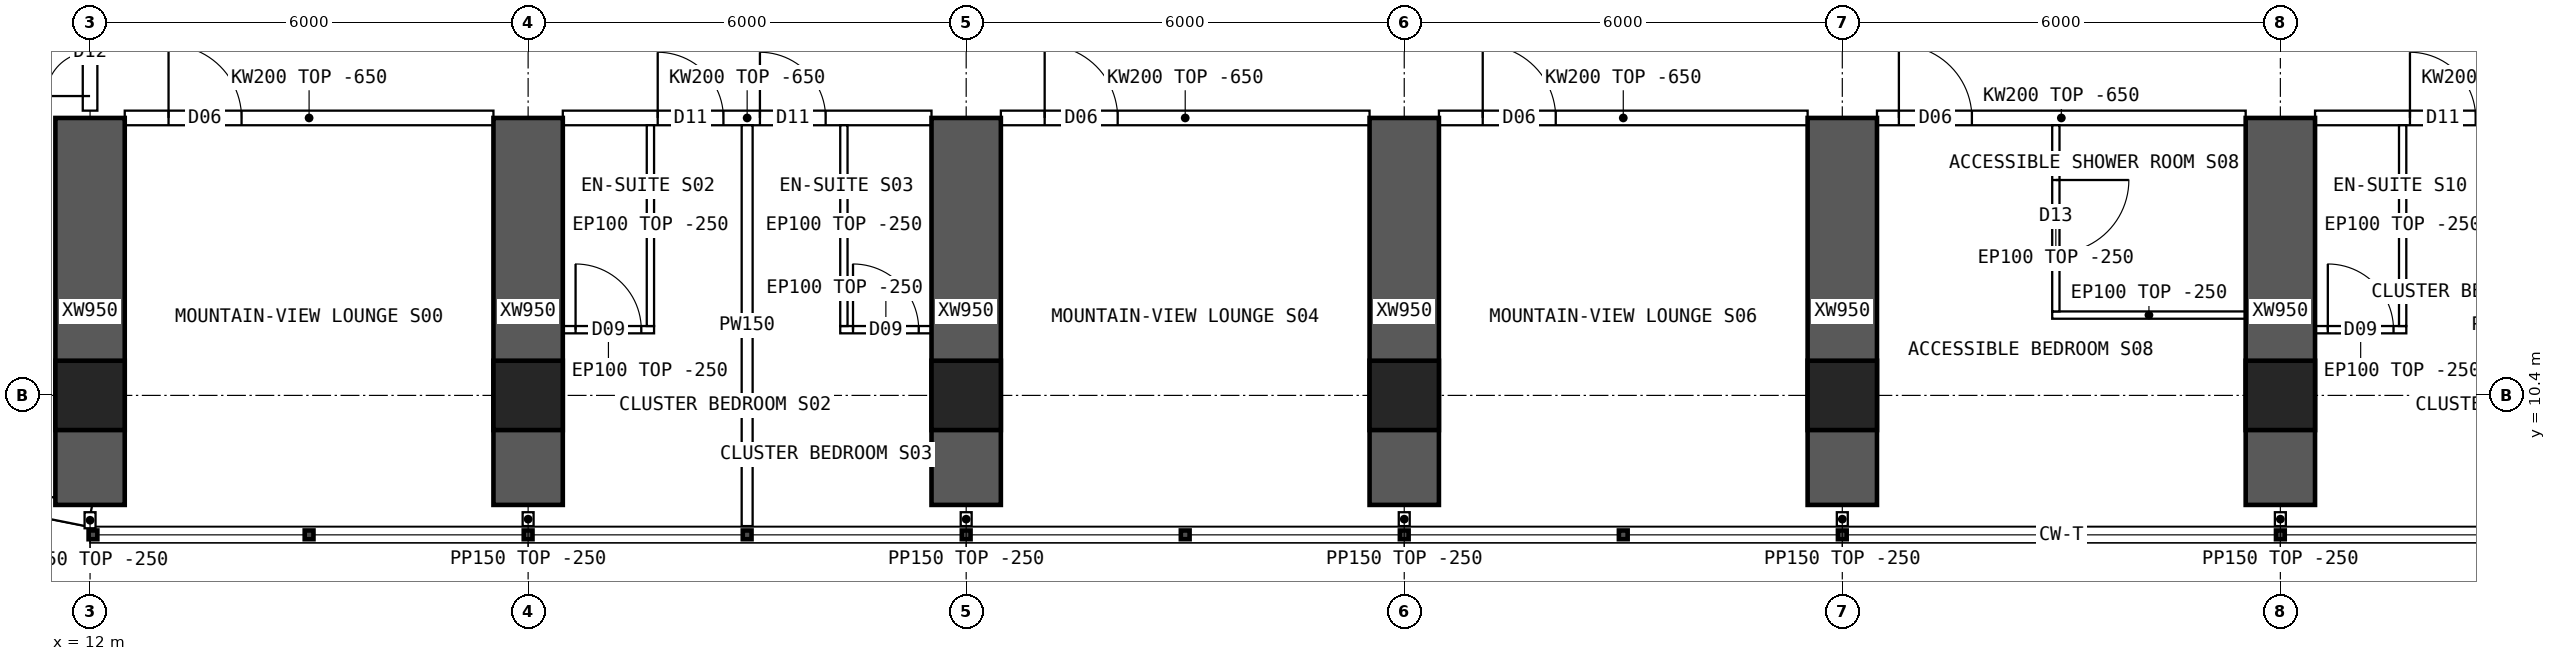
"""IFC4 building model, lengths in metres.
Left out: names, types, materials, properties, quantities, classifications, styles, units other than length and angle.
Written with IfcOpenShell. Run it as: python <this file> out.ifc"""

import sys

from ifc_helpers import new_model, si_unit, direction, frame, frame_2d, origin, origin_2d, place, context, subcontext, project, spatial, polyline, rectangle, hollow_rectangle, outline, extrude, element, fill, save


model = new_model("IFC4")
c1 = context("Model", 3, precision=1e-05, world=origin(), true_north=direction((0.0, 1.0)))
c2 = subcontext(c1, "Body", "Model", "MODEL_VIEW")
j1 = project(units=[si_unit("LENGTHUNIT", "METRE"), si_unit("PLANEANGLEUNIT", "RADIAN")], contexts=[c1])
p1 = place(None, origin())
s1 = spatial("IfcSite", under=j1, at=p1, CompositionType="ELEMENT")
p2 = place(p1, origin())
s2 = spatial("IfcBuilding", under=s1, at=p2, CompositionType="ELEMENT")
p3 = place(p2, frame((0.0, 0.0, 106.9)))
s3 = spatial("IfcBuildingStorey", under=s2, at=p3, CompositionType="ELEMENT", Elevation=106.9)
for number, where, z_axis, x_axis in (
    (1, (12.0, 10.4, 0.0), (0.0, 0.0, 1.0), (1.0, 0.0, 0.0)),
    (2, (18.0, 10.4, 0.0), (0.0, 0.0, 1.0), (1.0, 0.0, 0.0)),
    (3, (24.0, 10.4, 0.0), (0.0, 0.0, 1.0), (1.0, 0.0, 0.0)),
    (4, (30.0, 10.4, 0.0), (0.0, 0.0, 1.0), (1.0, 0.0, 0.0)),
    (5, (36.0, 10.4, 0.0), (0.0, 0.0, 1.0), (1.0, 0.0, 0.0)),
    (6, (42.0, 10.4, 0.0), (0.0, 0.0, 1.0), (1.0, 0.0, 0.0)),
):
    element("IfcColumn", number, at=place(p3, frame(where, z_axis=z_axis, x_axis=x_axis)), inside=s3, PredefinedType="COLUMN", context=c2, shape_type="SweptSolid", body=[
        extrude(hollow_rectangle(XDim=0.95, YDim=0.95, WallThickness=0.095, at=origin_2d()), origin(), (0.0, 0.0, 1.0), 3.75),
    ])
for number, where, z_axis, x_axis in (
    (7, (12.0, 8.9, 0.0), (0.0, 0.0, 1.0), (0.0, 1.0, 0.0)),
    (8, (18.0, 8.9, 0.0), (0.0, 0.0, 1.0), (0.0, 1.0, 0.0)),
    (9, (24.0, 8.9, 0.0), (0.0, 0.0, 1.0), (0.0, 1.0, 0.0)),
    (10, (30.0, 8.9, 0.0), (0.0, 0.0, 1.0), (0.0, 1.0, 0.0)),
    (11, (36.0, 8.9, 0.0), (0.0, 0.0, 1.0), (0.0, 1.0, 0.0)),
    (12, (42.0, 8.9, 0.0), (0.0, 0.0, 1.0), (0.0, 1.0, 0.0)),
):
    element("IfcWall", number, at=place(p3, frame(where, z_axis=z_axis, x_axis=x_axis)), inside=s3, PredefinedType="SHEAR", context=c2, shape_type="SweptSolid", body=[
        extrude(rectangle(XDim=5.3, YDim=0.95, at=frame_2d((2.65, 0.0))), origin(), (0.0, 0.0, 1.0), 3.75),
    ])
p4 = place(p3, frame((8.843, 9.378, 0.0), z_axis=(0.0, 0.0, 1.0), x_axis=(0.980787251524, -0.195080412259, 0.0)))
e13 = element("IfcWall", 13, at=p4, inside=s3, PredefinedType="SOLIDWALL", context=c2, shape_type="SweptSolid", body=[
    extrude(outline(polyline([(-0.03, -0.15), (3.249, -0.15), (3.189, 0.15), (0.03, 0.15), (-0.03, -0.15)])), origin(), (0.0, 0.0, 1.0), 3.5),
])
p5 = place(p4, frame((0.909, 0.0, 0.9)))
e14 = element("IfcOpeningElement", 14, at=p5, cuts=e13, PredefinedType="OPENING", context=c2, shape_type="SweptSolid", body=[
    extrude(rectangle(XDim=1.4, YDim=1.8, at=frame_2d((0.7, 0.9))), frame((0.0, 0.16, 0.0), z_axis=(0.0, -1.0, 0.0), x_axis=(1.0, 0.0, 0.0)), (0.0, 0.0, 1.0), 0.32),
])
p6 = place(p3, frame((12.475, 14.2, 0.0), z_axis=(0.0, 0.0, 1.0), x_axis=(1.0, 0.0, 0.0)))
e15 = element("IfcWall", 15, at=p6, inside=s3, PredefinedType="SOLIDWALL", context=c2, shape_type="SweptSolid", body=[
    extrude(outline(polyline([(0.0, 0.0), (5.05, 0.0), (5.05, 3.1), (0.0, 3.1), (0.0, 0.0)])), frame((0.0, 0.1, 0.0), z_axis=(0.0, -1.0, 0.0), x_axis=(1.0, 0.0, 0.0)), (0.0, 0.0, 1.0), 0.2),
])
p7 = place(p6, frame((0.6, 0.0, 0.0)))
e16 = element("IfcOpeningElement", 16, at=p7, cuts=e15, PredefinedType="OPENING", context=c2, shape_type="SweptSolid", body=[
    extrude(rectangle(XDim=1.0, YDim=2.1, at=frame_2d((0.5, 1.05))), frame((0.0, 0.11, 0.0), z_axis=(0.0, -1.0, 0.0), x_axis=(1.0, 0.0, 0.0)), (0.0, 0.0, 1.0), 0.22),
])
p8 = place(p3, frame((18.475, 14.2, 0.0), z_axis=(0.0, 0.0, 1.0), x_axis=(1.0, 0.0, 0.0)))
e17 = element("IfcWall", 17, at=p8, inside=s3, PredefinedType="SOLIDWALL", context=c2, shape_type="SweptSolid", body=[
    extrude(outline(polyline([(0.0, 0.0), (5.05, 0.0), (5.05, 3.1), (0.0, 3.1), (0.0, 0.0)])), frame((0.0, 0.1, 0.0), z_axis=(0.0, -1.0, 0.0), x_axis=(1.0, 0.0, 0.0)), (0.0, 0.0, 1.0), 0.2),
])
p9 = place(p8, frame((1.3, 0.0, 0.0)))
e18 = element("IfcOpeningElement", 18, at=p9, cuts=e17, PredefinedType="OPENING", context=c2, shape_type="SweptSolid", body=[
    extrude(rectangle(XDim=0.9, YDim=2.1, at=frame_2d((0.45, 1.05))), frame((0.0, 0.11, 0.0), z_axis=(0.0, -1.0, 0.0), x_axis=(1.0, 0.0, 0.0)), (0.0, 0.0, 1.0), 0.22),
])
p10 = place(p8, frame((2.7, 0.0, 0.0)))
e19 = element("IfcOpeningElement", 19, at=p10, cuts=e17, PredefinedType="OPENING", context=c2, shape_type="SweptSolid", body=[
    extrude(rectangle(XDim=0.9, YDim=2.1, at=frame_2d((0.45, 1.05))), frame((0.0, 0.11, 0.0), z_axis=(0.0, -1.0, 0.0), x_axis=(1.0, 0.0, 0.0)), (0.0, 0.0, 1.0), 0.22),
])
p11 = place(p3, frame((24.475, 14.2, 0.0), z_axis=(0.0, 0.0, 1.0), x_axis=(1.0, 0.0, 0.0)))
e20 = element("IfcWall", 20, at=p11, inside=s3, PredefinedType="SOLIDWALL", context=c2, shape_type="SweptSolid", body=[
    extrude(outline(polyline([(0.0, 0.0), (5.05, 0.0), (5.05, 3.1), (0.0, 3.1), (0.0, 0.0)])), frame((0.0, 0.1, 0.0), z_axis=(0.0, -1.0, 0.0), x_axis=(1.0, 0.0, 0.0)), (0.0, 0.0, 1.0), 0.2),
])
p12 = place(p11, frame((0.6, 0.0, 0.0)))
e21 = element("IfcOpeningElement", 21, at=p12, cuts=e20, PredefinedType="OPENING", context=c2, shape_type="SweptSolid", body=[
    extrude(rectangle(XDim=1.0, YDim=2.1, at=frame_2d((0.5, 1.05))), frame((0.0, 0.11, 0.0), z_axis=(0.0, -1.0, 0.0), x_axis=(1.0, 0.0, 0.0)), (0.0, 0.0, 1.0), 0.22),
])
p13 = place(p3, frame((30.475, 14.2, 0.0), z_axis=(0.0, 0.0, 1.0), x_axis=(1.0, 0.0, 0.0)))
e22 = element("IfcWall", 22, at=p13, inside=s3, PredefinedType="SOLIDWALL", context=c2, shape_type="SweptSolid", body=[
    extrude(outline(polyline([(0.0, 0.0), (5.05, 0.0), (5.05, 3.1), (0.0, 3.1), (0.0, 0.0)])), frame((0.0, 0.1, 0.0), z_axis=(0.0, -1.0, 0.0), x_axis=(1.0, 0.0, 0.0)), (0.0, 0.0, 1.0), 0.2),
])
p14 = place(p13, frame((0.6, 0.0, 0.0)))
e23 = element("IfcOpeningElement", 23, at=p14, cuts=e22, PredefinedType="OPENING", context=c2, shape_type="SweptSolid", body=[
    extrude(rectangle(XDim=1.0, YDim=2.1, at=frame_2d((0.5, 1.05))), frame((0.0, 0.11, 0.0), z_axis=(0.0, -1.0, 0.0), x_axis=(1.0, 0.0, 0.0)), (0.0, 0.0, 1.0), 0.22),
])
p15 = place(p3, frame((36.475, 14.2, 0.0), z_axis=(0.0, 0.0, 1.0), x_axis=(1.0, 0.0, 0.0)))
e24 = element("IfcWall", 24, at=p15, inside=s3, PredefinedType="SOLIDWALL", context=c2, shape_type="SweptSolid", body=[
    extrude(outline(polyline([(0.0, 0.0), (5.05, 0.0), (5.05, 3.1), (0.0, 3.1), (0.0, 0.0)])), frame((0.0, 0.1, 0.0), z_axis=(0.0, -1.0, 0.0), x_axis=(1.0, 0.0, 0.0)), (0.0, 0.0, 1.0), 0.2),
])
p16 = place(p15, frame((0.3, 0.0, 0.0)))
e25 = element("IfcOpeningElement", 25, at=p16, cuts=e24, PredefinedType="OPENING", context=c2, shape_type="SweptSolid", body=[
    extrude(rectangle(XDim=1.0, YDim=2.1, at=frame_2d((0.5, 1.05))), frame((0.0, 0.11, 0.0), z_axis=(0.0, -1.0, 0.0), x_axis=(1.0, 0.0, 0.0)), (0.0, 0.0, 1.0), 0.22),
])
p17 = place(p3, frame((42.475, 14.2, 0.0), z_axis=(0.0, 0.0, 1.0), x_axis=(1.0, 0.0, 0.0)))
e26 = element("IfcWall", 26, at=p17, inside=s3, PredefinedType="SOLIDWALL", context=c2, shape_type="SweptSolid", body=[
    extrude(outline(polyline([(0.0, 0.0), (5.05, 0.0), (5.05, 3.1), (0.0, 3.1), (0.0, 0.0)])), frame((0.0, 0.1, 0.0), z_axis=(0.0, -1.0, 0.0), x_axis=(1.0, 0.0, 0.0)), (0.0, 0.0, 1.0), 0.2),
])
p18 = place(p17, frame((1.3, 0.0, 0.0)))
e27 = element("IfcOpeningElement", 27, at=p18, cuts=e26, PredefinedType="OPENING", context=c2, shape_type="SweptSolid", body=[
    extrude(rectangle(XDim=0.9, YDim=2.1, at=frame_2d((0.45, 1.05))), frame((0.0, 0.11, 0.0), z_axis=(0.0, -1.0, 0.0), x_axis=(1.0, 0.0, 0.0)), (0.0, 0.0, 1.0), 0.22),
])
p19 = place(p17, frame((2.7, 0.0, 0.0)))
e28 = element("IfcOpeningElement", 28, at=p19, cuts=e26, PredefinedType="OPENING", context=c2, shape_type="SweptSolid", body=[
    extrude(rectangle(XDim=0.9, YDim=2.1, at=frame_2d((0.45, 1.05))), frame((0.0, 0.11, 0.0), z_axis=(0.0, -1.0, 0.0), x_axis=(1.0, 0.0, 0.0)), (0.0, 0.0, 1.0), 0.22),
])
p20 = place(p3, frame((21.0, 8.61, 0.0), z_axis=(0.0, 0.0, 1.0), x_axis=(0.0, 1.0, 0.0)))
e29 = element("IfcWall", 29, at=p20, inside=s3, PredefinedType="PARTITIONING", context=c2, shape_type="SweptSolid", body=[
    extrude(outline(polyline([(0.0, 0.0), (5.49, 0.0), (5.49, 3.1), (5.442, 3.1), (5.44, 3.5), (1.992, 3.5), (1.99, 3.1), (1.592, 3.1), (1.59, 3.5), (0.0, 3.5), (0.0, 0.0)])), frame((0.0, 0.075, 0.0), z_axis=(0.0, -1.0, 0.0), x_axis=(1.0, 0.0, 0.0)), (0.0, 0.0, 1.0), 0.15),
])
p21 = place(p3, frame((19.725, 11.3, 0.0), z_axis=(0.0, 0.0, 1.0), x_axis=(-1.0, 0.0, 0.0)))
e30 = element("IfcWall", 30, at=p21, inside=s3, PredefinedType="PARTITIONING", context=c2, shape_type="SweptSolid", body=[
    extrude(rectangle(XDim=1.25, YDim=0.1, at=frame_2d((0.625, 0.0))), origin(), (0.0, 0.0, 1.0), 3.5),
])
p22 = place(p21, frame((0.175, 0.0, 0.0)))
e31 = element("IfcOpeningElement", 31, at=p22, cuts=e30, PredefinedType="OPENING", context=c2, shape_type="SweptSolid", body=[
    extrude(rectangle(XDim=0.9, YDim=2.1, at=frame_2d((0.45, 1.05))), frame((0.0, 0.06, 0.0), z_axis=(0.0, -1.0, 0.0), x_axis=(1.0, 0.0, 0.0)), (0.0, 0.0, 1.0), 0.12),
])
p23 = place(p3, frame((19.675, 11.35, 0.0), z_axis=(0.0, 0.0, 1.0), x_axis=(0.0, 1.0, 0.0)))
e32 = element("IfcWall", 32, at=p23, inside=s3, PredefinedType="PARTITIONING", context=c2, shape_type="SweptSolid", body=[
    extrude(outline(polyline([(0.0, 0.0), (2.75, 0.0), (2.75, 3.1), (2.702, 3.1), (2.7, 3.5), (0.0, 3.5), (0.0, 0.0)])), frame((0.0, 0.05, 0.0), z_axis=(0.0, -1.0, 0.0), x_axis=(1.0, 0.0, 0.0)), (0.0, 0.0, 1.0), 0.1),
])
p24 = place(p3, frame((23.525, 11.3, 0.0), z_axis=(0.0, 0.0, 1.0), x_axis=(-1.0, 0.0, 0.0)))
e33 = element("IfcWall", 33, at=p24, inside=s3, PredefinedType="PARTITIONING", context=c2, shape_type="SweptSolid", body=[
    extrude(rectangle(XDim=1.25, YDim=0.1, at=frame_2d((0.625, 0.0))), origin(), (0.0, 0.0, 1.0), 3.5),
])
p25 = place(p24, frame((0.175, 0.0, 0.0)))
e34 = element("IfcOpeningElement", 34, at=p25, cuts=e33, PredefinedType="OPENING", context=c2, shape_type="SweptSolid", body=[
    extrude(rectangle(XDim=0.9, YDim=2.1, at=frame_2d((0.45, 1.05))), frame((0.0, 0.06, 0.0), z_axis=(0.0, -1.0, 0.0), x_axis=(1.0, 0.0, 0.0)), (0.0, 0.0, 1.0), 0.12),
])
p26 = place(p3, frame((22.325, 11.35, 0.0), z_axis=(0.0, 0.0, 1.0), x_axis=(0.0, 1.0, 0.0)))
e35 = element("IfcWall", 35, at=p26, inside=s3, PredefinedType="PARTITIONING", context=c2, shape_type="SweptSolid", body=[
    extrude(outline(polyline([(0.0, 0.0), (2.75, 0.0), (2.75, 3.1), (2.702, 3.1), (2.7, 3.5), (0.0, 3.5), (0.0, 0.0)])), frame((0.0, 0.05, 0.0), z_axis=(0.0, -1.0, 0.0), x_axis=(1.0, 0.0, 0.0)), (0.0, 0.0, 1.0), 0.1),
])
p27 = place(p3, frame((38.875, 11.5, 0.0), z_axis=(0.0, 0.0, 1.0), x_axis=(1.0, 0.0, 0.0)))
e36 = element("IfcWall", 36, at=p27, inside=s3, PredefinedType="PARTITIONING", context=c2, shape_type="SweptSolid", body=[
    extrude(rectangle(XDim=2.65, YDim=0.1, at=frame_2d((1.325, 0.0))), origin(), (0.0, 0.0, 1.0), 3.5),
])
p28 = place(p3, frame((38.925, 11.55, 0.0), z_axis=(0.0, 0.0, 1.0), x_axis=(0.0, 1.0, 0.0)))
e37 = element("IfcWall", 37, at=p28, inside=s3, PredefinedType="PARTITIONING", context=c2, shape_type="SweptSolid", body=[
    extrude(outline(polyline([(0.0, 0.0), (2.55, 0.0), (2.55, 3.1), (2.502, 3.1), (2.5, 3.5), (0.0, 3.5), (0.0, 0.0)])), frame((0.0, 0.05, 0.0), z_axis=(0.0, -1.0, 0.0), x_axis=(1.0, 0.0, 0.0)), (0.0, 0.0, 1.0), 0.1),
])
p29 = place(p28, frame((0.8, 0.0, 0.0)))
e38 = element("IfcOpeningElement", 38, at=p29, cuts=e37, PredefinedType="OPENING", context=c2, shape_type="SweptSolid", body=[
    extrude(rectangle(XDim=1.0, YDim=2.1, at=frame_2d((0.5, 1.05))), frame((0.0, 0.06, 0.0), z_axis=(0.0, -1.0, 0.0), x_axis=(1.0, 0.0, 0.0)), (0.0, 0.0, 1.0), 0.12),
])
p30 = place(p3, frame((43.725, 11.3, 0.0), z_axis=(0.0, 0.0, 1.0), x_axis=(-1.0, 0.0, 0.0)))
e39 = element("IfcWall", 39, at=p30, inside=s3, PredefinedType="PARTITIONING", context=c2, shape_type="SweptSolid", body=[
    extrude(rectangle(XDim=1.25, YDim=0.1, at=frame_2d((0.625, 0.0))), origin(), (0.0, 0.0, 1.0), 3.5),
])
p31 = place(p30, frame((0.175, 0.0, 0.0)))
e40 = element("IfcOpeningElement", 40, at=p31, cuts=e39, PredefinedType="OPENING", context=c2, shape_type="SweptSolid", body=[
    extrude(rectangle(XDim=0.9, YDim=2.1, at=frame_2d((0.45, 1.05))), frame((0.0, 0.06, 0.0), z_axis=(0.0, -1.0, 0.0), x_axis=(1.0, 0.0, 0.0)), (0.0, 0.0, 1.0), 0.12),
])
p32 = place(p3, frame((43.675, 11.35, 0.0), z_axis=(0.0, 0.0, 1.0), x_axis=(0.0, 1.0, 0.0)))
e41 = element("IfcWall", 41, at=p32, inside=s3, PredefinedType="PARTITIONING", context=c2, shape_type="SweptSolid", body=[
    extrude(outline(polyline([(0.0, 0.0), (2.75, 0.0), (2.75, 3.1), (2.702, 3.1), (2.7, 3.5), (0.0, 3.5), (0.0, 0.0)])), frame((0.0, 0.05, 0.0), z_axis=(0.0, -1.0, 0.0), x_axis=(1.0, 0.0, 0.0)), (0.0, 0.0, 1.0), 0.1),
])
p33 = place(p3, frame((12.0, 14.3, 0.0), z_axis=(0.0, 0.0, 1.0), x_axis=(0.0, 1.0, 0.0)))
e42 = element("IfcWall", 42, at=p33, inside=s3, PredefinedType="SOLIDWALL", context=c2, shape_type="SweptSolid", body=[
    extrude(outline(polyline([(0.0, 0.0), (1.6, 0.0), (1.6, 3.1), (0.0, 3.1), (0.0, 0.0)])), frame((0.0, 0.1, 0.0), z_axis=(0.0, -1.0, 0.0), x_axis=(1.0, 0.0, 0.0)), (0.0, 0.0, 1.0), 0.2),
])
p34 = place(p33, frame((0.2, 0.0, 0.0)))
e43 = element("IfcOpeningElement", 43, at=p34, cuts=e42, PredefinedType="OPENING", context=c2, shape_type="SweptSolid", body=[
    extrude(rectangle(XDim=1.2, YDim=2.1, at=frame_2d((0.6, 1.05))), frame((0.0, 0.11, 0.0), z_axis=(0.0, -1.0, 0.0), x_axis=(1.0, 0.0, 0.0)), (0.0, 0.0, 1.0), 0.22),
])
p35 = place(p3, frame((12.0, 8.8, 0.0), z_axis=(0.0, 0.0, 1.0), x_axis=(0.0, -1.0, 0.0)))
e44 = element("IfcWall", 44, at=p35, inside=s3, PredefinedType="PARTITIONING", context=c2, shape_type="SweptSolid", body=[
    extrude(rectangle(XDim=0.22, YDim=0.15, at=frame_2d((0.11, 0.0))), origin(), (0.0, 0.0, 1.0), 3.5),
])
for number, where, z_axis, x_axis in (
    (45, (18.0, 8.8, 0.0), (0.0, 0.0, 1.0), (0.0, -1.0, 0.0)),
    (46, (24.0, 8.8, 0.0), (0.0, 0.0, 1.0), (0.0, -1.0, 0.0)),
    (47, (30.0, 8.8, 0.0), (0.0, 0.0, 1.0), (0.0, -1.0, 0.0)),
    (48, (36.0, 8.8, 0.0), (0.0, 0.0, 1.0), (0.0, -1.0, 0.0)),
    (49, (42.0, 8.8, 0.0), (0.0, 0.0, 1.0), (0.0, -1.0, 0.0)),
):
    element("IfcWall", number, at=place(p3, frame(where, z_axis=z_axis, x_axis=x_axis)), inside=s3, PredefinedType="PARTITIONING", context=c2, shape_type="SweptSolid", body=[
        extrude(rectangle(XDim=0.19, YDim=0.15, at=frame_2d((0.095, 0.0))), origin(), (0.0, 0.0, 1.0), 3.5),
    ])
p36 = place(p7, origin())
e50 = element("IfcDoor", 50, at=p36, inside=s3, OperationType="SINGLE_SWING_LEFT", PredefinedType="DOOR", context=c2, shape_type="SweptSolid", body=[
    extrude(rectangle(XDim=1.0, YDim=2.1, at=frame_2d((0.5, 1.05))), frame((0.0, 0.025, 0.0), z_axis=(0.0, -1.0, 0.0), x_axis=(1.0, 0.0, 0.0)), (0.0, 0.0, 1.0), 0.05),
])
fill(e16, e50)
p37 = place(p22, origin())
e51 = element("IfcDoor", 51, at=p37, inside=s3, OperationType="SINGLE_SWING_RIGHT", PredefinedType="DOOR", context=c2, shape_type="SweptSolid", body=[
    extrude(rectangle(XDim=0.9, YDim=2.1, at=frame_2d((0.45, 1.05))), frame((0.0, 0.025, 0.0), z_axis=(0.0, -1.0, 0.0), x_axis=(1.0, 0.0, 0.0)), (0.0, 0.0, 1.0), 0.05),
])
fill(e31, e51)
p38 = place(p9, origin())
e52 = element("IfcDoor", 52, at=p38, inside=s3, OperationType="SINGLE_SWING_LEFT", PredefinedType="DOOR", context=c2, shape_type="SweptSolid", body=[
    extrude(rectangle(XDim=0.9, YDim=2.1, at=frame_2d((0.45, 1.05))), frame((0.0, 0.025, 0.0), z_axis=(0.0, -1.0, 0.0), x_axis=(1.0, 0.0, 0.0)), (0.0, 0.0, 1.0), 0.05),
])
fill(e18, e52)
p39 = place(p25, origin())
e53 = element("IfcDoor", 53, at=p39, inside=s3, OperationType="SINGLE_SWING_RIGHT", PredefinedType="DOOR", context=c2, shape_type="SweptSolid", body=[
    extrude(rectangle(XDim=0.9, YDim=2.1, at=frame_2d((0.45, 1.05))), frame((0.0, 0.025, 0.0), z_axis=(0.0, -1.0, 0.0), x_axis=(1.0, 0.0, 0.0)), (0.0, 0.0, 1.0), 0.05),
])
fill(e34, e53)
p40 = place(p10, origin())
e54 = element("IfcDoor", 54, at=p40, inside=s3, OperationType="SINGLE_SWING_LEFT", PredefinedType="DOOR", context=c2, shape_type="SweptSolid", body=[
    extrude(rectangle(XDim=0.9, YDim=2.1, at=frame_2d((0.45, 1.05))), frame((0.0, 0.025, 0.0), z_axis=(0.0, -1.0, 0.0), x_axis=(1.0, 0.0, 0.0)), (0.0, 0.0, 1.0), 0.05),
])
fill(e19, e54)
p41 = place(p12, origin())
e55 = element("IfcDoor", 55, at=p41, inside=s3, OperationType="SINGLE_SWING_LEFT", PredefinedType="DOOR", context=c2, shape_type="SweptSolid", body=[
    extrude(rectangle(XDim=1.0, YDim=2.1, at=frame_2d((0.5, 1.05))), frame((0.0, 0.025, 0.0), z_axis=(0.0, -1.0, 0.0), x_axis=(1.0, 0.0, 0.0)), (0.0, 0.0, 1.0), 0.05),
])
fill(e21, e55)
p42 = place(p14, origin())
e56 = element("IfcDoor", 56, at=p42, inside=s3, OperationType="SINGLE_SWING_LEFT", PredefinedType="DOOR", context=c2, shape_type="SweptSolid", body=[
    extrude(rectangle(XDim=1.0, YDim=2.1, at=frame_2d((0.5, 1.05))), frame((0.0, 0.025, 0.0), z_axis=(0.0, -1.0, 0.0), x_axis=(1.0, 0.0, 0.0)), (0.0, 0.0, 1.0), 0.05),
])
fill(e23, e56)
p43 = place(p29, origin())
e57 = element("IfcDoor", 57, at=p43, inside=s3, OperationType="SINGLE_SWING_RIGHT", PredefinedType="DOOR", context=c2, shape_type="SweptSolid", body=[
    extrude(rectangle(XDim=1.0, YDim=2.1, at=frame_2d((0.5, 1.05))), frame((0.0, 0.025, 0.0), z_axis=(0.0, -1.0, 0.0), x_axis=(1.0, 0.0, 0.0)), (0.0, 0.0, 1.0), 0.05),
])
fill(e38, e57)
p44 = place(p16, origin())
e58 = element("IfcDoor", 58, at=p44, inside=s3, OperationType="SINGLE_SWING_LEFT", PredefinedType="DOOR", context=c2, shape_type="SweptSolid", body=[
    extrude(rectangle(XDim=1.0, YDim=2.1, at=frame_2d((0.5, 1.05))), frame((0.0, 0.025, 0.0), z_axis=(0.0, -1.0, 0.0), x_axis=(1.0, 0.0, 0.0)), (0.0, 0.0, 1.0), 0.05),
])
fill(e25, e58)
p45 = place(p31, origin())
e59 = element("IfcDoor", 59, at=p45, inside=s3, OperationType="SINGLE_SWING_RIGHT", PredefinedType="DOOR", context=c2, shape_type="SweptSolid", body=[
    extrude(rectangle(XDim=0.9, YDim=2.1, at=frame_2d((0.45, 1.05))), frame((0.0, 0.025, 0.0), z_axis=(0.0, -1.0, 0.0), x_axis=(1.0, 0.0, 0.0)), (0.0, 0.0, 1.0), 0.05),
])
fill(e40, e59)
p46 = place(p18, origin())
e60 = element("IfcDoor", 60, at=p46, inside=s3, OperationType="SINGLE_SWING_LEFT", PredefinedType="DOOR", context=c2, shape_type="SweptSolid", body=[
    extrude(rectangle(XDim=0.9, YDim=2.1, at=frame_2d((0.45, 1.05))), frame((0.0, 0.025, 0.0), z_axis=(0.0, -1.0, 0.0), x_axis=(1.0, 0.0, 0.0)), (0.0, 0.0, 1.0), 0.05),
])
fill(e27, e60)
p47 = place(p34, origin())
e61 = element("IfcDoor", 61, at=p47, inside=s3, OperationType="DOUBLE_DOOR_SINGLE_SWING", PredefinedType="DOOR", context=c2, shape_type="SweptSolid", body=[
    extrude(rectangle(XDim=1.2, YDim=2.1, at=frame_2d((0.6, 1.05))), frame((0.0, 0.025, 0.0), z_axis=(0.0, -1.0, 0.0), x_axis=(1.0, 0.0, 0.0)), (0.0, 0.0, 1.0), 0.05),
])
fill(e43, e61)
save(model, sys.argv[1])
